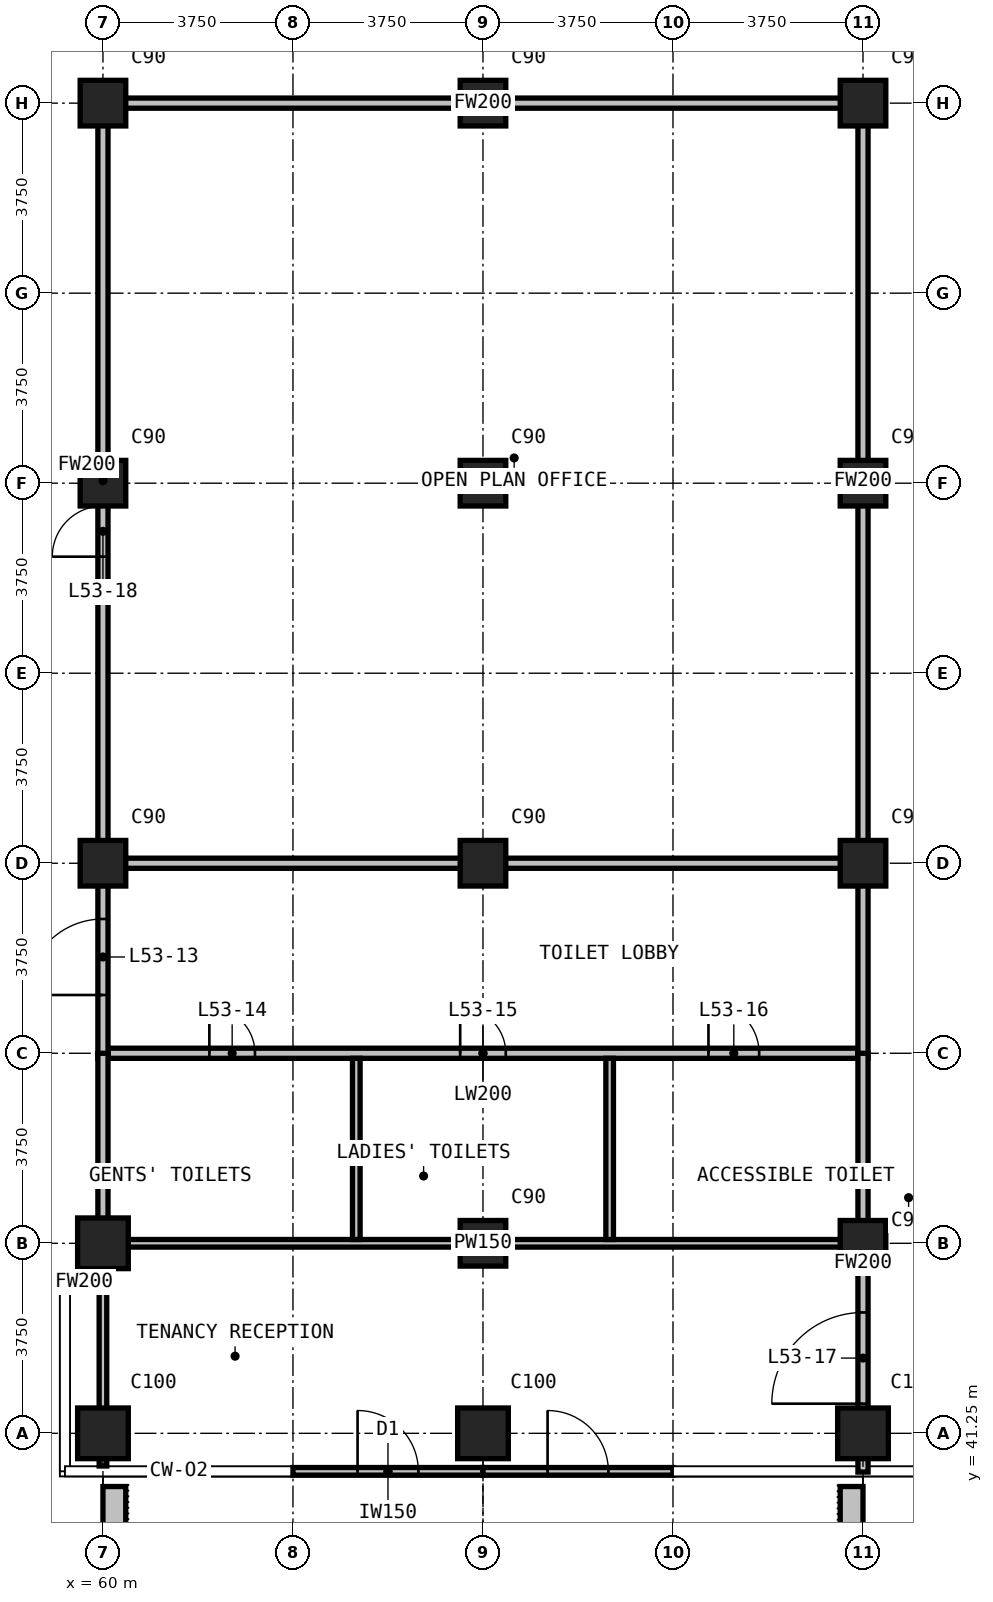
"""IFC4 building model, lengths in metres.
Left out: names, types, materials, properties, quantities, classifications, styles, units other than length and angle.
Written with IfcOpenShell. Run it as: python <this file> out.ifc"""

import sys

from ifc_helpers import new_model, si_unit, direction, frame, frame_2d, origin, origin_2d, place, context, subcontext, project, spatial, rectangle, extrude, element, fill, save


model = new_model("IFC4")
c1 = context("Model", 3, precision=1e-05, world=origin(), true_north=direction((0.0, 1.0)))
c2 = subcontext(c1, "Body", "Model", "MODEL_VIEW")
j1 = project(units=[si_unit("LENGTHUNIT", "METRE"), si_unit("PLANEANGLEUNIT", "RADIAN")], contexts=[c1])
p1 = place(None, origin())
s1 = spatial("IfcSite", under=j1, at=p1, CompositionType="ELEMENT")
p2 = place(p1, origin())
s2 = spatial("IfcBuilding", under=s1, at=p2, CompositionType="ELEMENT")
p3 = place(p2, frame((0.0, 0.0, 206.7)))
s3 = spatial("IfcBuildingStorey", under=s2, at=p3, CompositionType="ELEMENT", Elevation=206.7)
for number, where, z_axis, x_axis in (
    (1, (60.0, 41.25, 0.0), (0.0, 0.0, 1.0), (1.0, 0.0, 0.0)),
    (2, (60.0, 45.0, 0.0), (0.0, 0.0, 1.0), (1.0, 0.0, 0.0)),
):
    element("IfcColumn", number, at=place(p3, frame(where, z_axis=z_axis, x_axis=x_axis)), inside=s3, PredefinedType="COLUMN", context=c2, shape_type="SweptSolid", body=[
        extrude(rectangle(XDim=1.0, YDim=1.0, at=origin_2d()), origin(), (0.0, 0.0, 1.0), 3.6),
    ])
for number, where, z_axis, x_axis in (
    (3, (60.0, 52.5, 0.0), (0.0, 0.0, 1.0), (1.0, 0.0, 0.0)),
    (4, (60.0, 60.0, 0.0), (0.0, 0.0, 1.0), (1.0, 0.0, 0.0)),
    (5, (60.0, 67.5, 0.0), (0.0, 0.0, 1.0), (1.0, 0.0, 0.0)),
):
    element("IfcColumn", number, at=place(p3, frame(where, z_axis=z_axis, x_axis=x_axis)), inside=s3, PredefinedType="COLUMN", context=c2, shape_type="SweptSolid", body=[
        extrude(rectangle(XDim=0.9, YDim=0.9, at=origin_2d()), origin(), (0.0, 0.0, 1.0), 3.6),
    ])
p4 = place(p3, frame((67.5, 41.25, 0.0), z_axis=(0.0, 0.0, 1.0), x_axis=(1.0, 0.0, 0.0)))
e6 = element("IfcColumn", 6, at=p4, inside=s3, PredefinedType="COLUMN", context=c2, shape_type="SweptSolid", body=[
    extrude(rectangle(XDim=1.0, YDim=1.0, at=origin_2d()), origin(), (0.0, 0.0, 1.0), 3.6),
])
for number, where, z_axis, x_axis in (
    (7, (67.5, 45.0, 0.0), (0.0, 0.0, 1.0), (1.0, 0.0, 0.0)),
    (8, (67.5, 52.5, 0.0), (0.0, 0.0, 1.0), (1.0, 0.0, 0.0)),
    (9, (67.5, 60.0, 0.0), (0.0, 0.0, 1.0), (1.0, 0.0, 0.0)),
    (10, (67.5, 67.5, 0.0), (0.0, 0.0, 1.0), (1.0, 0.0, 0.0)),
):
    element("IfcColumn", number, at=place(p3, frame(where, z_axis=z_axis, x_axis=x_axis)), inside=s3, PredefinedType="COLUMN", context=c2, shape_type="SweptSolid", body=[
        extrude(rectangle(XDim=0.9, YDim=0.9, at=origin_2d()), origin(), (0.0, 0.0, 1.0), 3.6),
    ])
p5 = place(p3, frame((75.0, 41.25, 0.0), z_axis=(0.0, 0.0, 1.0), x_axis=(1.0, 0.0, 0.0)))
e11 = element("IfcColumn", 11, at=p5, inside=s3, PredefinedType="COLUMN", context=c2, shape_type="SweptSolid", body=[
    extrude(rectangle(XDim=1.0, YDim=1.0, at=origin_2d()), origin(), (0.0, 0.0, 1.0), 3.6),
])
for number, where, z_axis, x_axis in (
    (12, (75.0, 45.0, 0.0), (0.0, 0.0, 1.0), (1.0, 0.0, 0.0)),
    (13, (75.0, 52.5, 0.0), (0.0, 0.0, 1.0), (1.0, 0.0, 0.0)),
    (14, (75.0, 60.0, 0.0), (0.0, 0.0, 1.0), (1.0, 0.0, 0.0)),
    (15, (75.0, 67.5, 0.0), (0.0, 0.0, 1.0), (1.0, 0.0, 0.0)),
):
    element("IfcColumn", number, at=place(p3, frame(where, z_axis=z_axis, x_axis=x_axis)), inside=s3, PredefinedType="COLUMN", context=c2, shape_type="SweptSolid", body=[
        extrude(rectangle(XDim=0.9, YDim=0.9, at=origin_2d()), origin(), (0.0, 0.0, 1.0), 3.6),
    ])
p6 = place(p3, frame((63.75, 40.5, 0.0), z_axis=(0.0, 0.0, 1.0), x_axis=(1.0, 0.0, 0.0)))
e16 = element("IfcWall", 16, at=p6, inside=s3, PredefinedType="SOLIDWALL", context=c2, shape_type="SweptSolid", body=[
    extrude(rectangle(XDim=3.75, YDim=0.15, at=frame_2d((1.875, 0.0))), origin(), (0.0, 0.0, 1.0), 3.3),
])
p7 = place(p6, frame((1.275, 0.0, 0.0)))
e17 = element("IfcOpeningElement", 17, at=p7, cuts=e16, PredefinedType="OPENING", context=c2, shape_type="SweptSolid", body=[
    extrude(rectangle(XDim=1.2, YDim=2.4, at=frame_2d((0.6, 1.2))), frame((0.0, 0.085, 0.0), z_axis=(0.0, -1.0, 0.0), x_axis=(1.0, 0.0, 0.0)), (0.0, 0.0, 1.0), 0.17),
])
p8 = place(p3, frame((67.5, 40.5, 0.0), z_axis=(0.0, 0.0, 1.0), x_axis=(1.0, 0.0, 0.0)))
e18 = element("IfcWall", 18, at=p8, inside=s3, PredefinedType="SOLIDWALL", context=c2, shape_type="SweptSolid", body=[
    extrude(rectangle(XDim=3.75, YDim=0.15, at=frame_2d((1.875, 0.0))), origin(), (0.0, 0.0, 1.0), 3.3),
])
p9 = place(p8, frame((1.275, 0.0, 0.0)))
e19 = element("IfcOpeningElement", 19, at=p9, cuts=e18, PredefinedType="OPENING", context=c2, shape_type="SweptSolid", body=[
    extrude(rectangle(XDim=1.2, YDim=2.4, at=frame_2d((0.6, 1.2))), frame((0.0, 0.085, 0.0), z_axis=(0.0, -1.0, 0.0), x_axis=(1.0, 0.0, 0.0)), (0.0, 0.0, 1.0), 0.17),
])
for number, where, z_axis, x_axis in (
    (20, (60.225, 40.2, 0.0), (0.0, 0.0, 1.0), (0.0, -1.0, 0.0)),
    (21, (74.775, 40.2, 0.0), (0.0, 0.0, 1.0), (0.0, -1.0, 0.0)),
):
    element("IfcWall", number, at=place(p3, frame(where, z_axis=z_axis, x_axis=x_axis)), inside=s3, PredefinedType="USERDEFINED", context=c2, shape_type="SweptSolid", body=[
        extrude(rectangle(XDim=2.35, YDim=0.45, at=frame_2d((1.175, 0.0))), origin(), (0.0, 0.0, 1.0), 1.1),
    ])
p10 = place(p3, frame((60.1, 48.75, 0.0), z_axis=(0.0, 0.0, 1.0), x_axis=(1.0, 0.0, 0.0)))
e22 = element("IfcWall", 22, at=p10, inside=s3, PredefinedType="PARTITIONING", context=c2, shape_type="SweptSolid", body=[
    extrude(rectangle(XDim=14.8, YDim=0.2, at=frame_2d((7.4, 0.0))), origin(), (0.0, 0.0, 1.0), 3.3),
])
p11 = place(p10, frame((2.0, 0.0, 0.0)))
e23 = element("IfcOpeningElement", 23, at=p11, cuts=e22, PredefinedType="OPENING", context=c2, shape_type="SweptSolid", body=[
    extrude(rectangle(XDim=0.9, YDim=2.2, at=frame_2d((0.45, 1.1))), frame((0.0, 0.11, 0.0), z_axis=(0.0, -1.0, 0.0), x_axis=(1.0, 0.0, 0.0)), (0.0, 0.0, 1.0), 0.22),
])
p12 = place(p10, frame((6.95, 0.0, 0.0)))
e24 = element("IfcOpeningElement", 24, at=p12, cuts=e22, PredefinedType="OPENING", context=c2, shape_type="SweptSolid", body=[
    extrude(rectangle(XDim=0.9, YDim=2.2, at=frame_2d((0.45, 1.1))), frame((0.0, 0.11, 0.0), z_axis=(0.0, -1.0, 0.0), x_axis=(1.0, 0.0, 0.0)), (0.0, 0.0, 1.0), 0.22),
])
p13 = place(p10, frame((11.85, 0.0, 0.0)))
e25 = element("IfcOpeningElement", 25, at=p13, cuts=e22, PredefinedType="OPENING", context=c2, shape_type="SweptSolid", body=[
    extrude(rectangle(XDim=1.0, YDim=2.2, at=frame_2d((0.5, 1.1))), frame((0.0, 0.11, 0.0), z_axis=(0.0, -1.0, 0.0), x_axis=(1.0, 0.0, 0.0)), (0.0, 0.0, 1.0), 0.22),
])
p14 = place(p3, frame((60.1, 52.5, 0.0), z_axis=(0.0, 0.0, 1.0), x_axis=(1.0, 0.0, 0.0)))
e26 = element("IfcWall", 26, at=p14, inside=s3, PredefinedType="PARTITIONING", context=c2, shape_type="SweptSolid", body=[
    extrude(rectangle(XDim=14.8, YDim=0.2, at=frame_2d((7.4, 0.0))), origin(), (0.0, 0.0, 1.0), 3.3),
])
p15 = place(p3, frame((60.0, 48.65, 0.0), z_axis=(0.0, 0.0, 1.0), x_axis=(0.0, 1.0, 0.0)))
e27 = element("IfcWall", 27, at=p15, inside=s3, PredefinedType="PARTITIONING", context=c2, shape_type="SweptSolid", body=[
    extrude(rectangle(XDim=3.95, YDim=0.2, at=frame_2d((1.975, 0.0))), origin(), (0.0, 0.0, 1.0), 3.3),
])
p16 = place(p15, frame((1.25, 0.0, 0.0)))
e28 = element("IfcOpeningElement", 28, at=p16, cuts=e27, PredefinedType="OPENING", context=c2, shape_type="SweptSolid", body=[
    extrude(rectangle(XDim=1.5, YDim=2.2, at=frame_2d((0.75, 1.1))), frame((0.0, 0.11, 0.0), z_axis=(0.0, -1.0, 0.0), x_axis=(1.0, 0.0, 0.0)), (0.0, 0.0, 1.0), 0.22),
])
p17 = place(p3, frame((75.0, 48.65, 0.0), z_axis=(0.0, 0.0, 1.0), x_axis=(0.0, 1.0, 0.0)))
e29 = element("IfcWall", 29, at=p17, inside=s3, PredefinedType="PARTITIONING", context=c2, shape_type="SweptSolid", body=[
    extrude(rectangle(XDim=3.95, YDim=0.2, at=frame_2d((1.975, 0.0))), origin(), (0.0, 0.0, 1.0), 3.3),
])
p18 = place(p3, frame((59.355, 44.235, 0.0), z_axis=(0.0, 0.0, 1.0), x_axis=(1.0, 0.0, 0.0)))
e30 = element("IfcWall", 30, at=p18, inside=s3, PredefinedType="PARTITIONING", context=c2, shape_type="SweptSolid", body=[
    extrude(rectangle(XDim=0.545, YDim=0.2, at=frame_2d((0.272, 0.0))), origin(), (0.0, 0.0, 1.0), 3.3),
])
p19 = place(p3, frame((60.1, 67.5, 0.0), z_axis=(0.0, 0.0, 1.0), x_axis=(1.0, 0.0, 0.0)))
e31 = element("IfcWall", 31, at=p19, inside=s3, PredefinedType="PARTITIONING", context=c2, shape_type="SweptSolid", body=[
    extrude(rectangle(XDim=14.8, YDim=0.2, at=frame_2d((7.4, 0.0))), origin(), (0.0, 0.0, 1.0), 3.3),
])
p20 = place(p3, frame((60.0, 44.135, 0.0), z_axis=(0.0, 0.0, 1.0), x_axis=(0.0, 1.0, 0.0)))
e32 = element("IfcWall", 32, at=p20, inside=s3, PredefinedType="PARTITIONING", context=c2, shape_type="SweptSolid", body=[
    extrude(rectangle(XDim=4.615, YDim=0.2, at=frame_2d((2.308, 0.0))), origin(), (0.0, 0.0, 1.0), 3.3),
])
p21 = place(p3, frame((60.0, 52.5, 0.0), z_axis=(0.0, 0.0, 1.0), x_axis=(0.0, 1.0, 0.0)))
e33 = element("IfcWall", 33, at=p21, inside=s3, PredefinedType="PARTITIONING", context=c2, shape_type="SweptSolid", body=[
    extrude(rectangle(XDim=15.1, YDim=0.2, at=frame_2d((7.55, 0.0))), origin(), (0.0, 0.0, 1.0), 3.3),
])
p22 = place(p21, frame((6.05, 0.0, 0.0)))
e34 = element("IfcOpeningElement", 34, at=p22, cuts=e33, PredefinedType="OPENING", context=c2, shape_type="SweptSolid", body=[
    extrude(rectangle(XDim=1.0, YDim=2.2, at=frame_2d((0.5, 1.1))), frame((0.0, 0.11, 0.0), z_axis=(0.0, -1.0, 0.0), x_axis=(1.0, 0.0, 0.0)), (0.0, 0.0, 1.0), 0.22),
])
p23 = place(p3, frame((75.0, 40.485, 0.0), z_axis=(0.0, 0.0, 1.0), x_axis=(0.0, 1.0, 0.0)))
e35 = element("IfcWall", 35, at=p23, inside=s3, PredefinedType="PARTITIONING", context=c2, shape_type="SweptSolid", body=[
    extrude(rectangle(XDim=8.265, YDim=0.2, at=frame_2d((4.132, 0.0))), origin(), (0.0, 0.0, 1.0), 3.3),
])
p24 = place(p23, frame((1.35, 0.0, 0.0)))
e36 = element("IfcOpeningElement", 36, at=p24, cuts=e35, PredefinedType="OPENING", context=c2, shape_type="SweptSolid", body=[
    extrude(rectangle(XDim=1.8, YDim=2.2, at=frame_2d((0.9, 1.1))), frame((0.0, 0.11, 0.0), z_axis=(0.0, -1.0, 0.0), x_axis=(1.0, 0.0, 0.0)), (0.0, 0.0, 1.0), 0.22),
])
p25 = place(p3, frame((75.0, 52.5, 0.0), z_axis=(0.0, 0.0, 1.0), x_axis=(0.0, 1.0, 0.0)))
e37 = element("IfcWall", 37, at=p25, inside=s3, PredefinedType="PARTITIONING", context=c2, shape_type="SweptSolid", body=[
    extrude(rectangle(XDim=15.1, YDim=0.2, at=frame_2d((7.55, 0.0))), origin(), (0.0, 0.0, 1.0), 3.3),
])
p26 = place(p3, frame((60.1, 45.0, 0.0), z_axis=(0.0, 0.0, 1.0), x_axis=(1.0, 0.0, 0.0)))
e38 = element("IfcWall", 38, at=p26, inside=s3, PredefinedType="PARTITIONING", context=c2, shape_type="SweptSolid", body=[
    extrude(rectangle(XDim=14.8, YDim=0.15, at=frame_2d((7.4, 0.0))), origin(), (0.0, 0.0, 1.0), 3.3),
])
p27 = place(p3, frame((60.0, 40.605, 0.0), z_axis=(0.0, 0.0, 1.0), x_axis=(0.0, 1.0, 0.0)))
e39 = element("IfcWall", 39, at=p27, inside=s3, PredefinedType="PARTITIONING", context=c2, shape_type="SweptSolid", body=[
    extrude(rectangle(XDim=3.6, YDim=0.15, at=frame_2d((1.8, 0.0))), origin(), (0.0, 0.0, 1.0), 3.3),
])
for number, where, z_axis, x_axis in (
    (40, (65.0, 45.075, 0.0), (0.0, 0.0, 1.0), (0.0, 1.0, 0.0)),
    (41, (70.0, 45.075, 0.0), (0.0, 0.0, 1.0), (0.0, 1.0, 0.0)),
):
    element("IfcWall", number, at=place(p3, frame(where, z_axis=z_axis, x_axis=x_axis)), inside=s3, PredefinedType="PARTITIONING", context=c2, shape_type="SweptSolid", body=[
        extrude(rectangle(XDim=3.575, YDim=0.15, at=frame_2d((1.788, 0.0))), origin(), (0.0, 0.0, 1.0), 3.3),
    ])
p28 = place(p7, origin())
e42 = element("IfcDoor", 42, at=p28, inside=s3, OperationType="SINGLE_SWING_LEFT", PredefinedType="DOOR", context=c2, shape_type="SweptSolid", body=[
    extrude(rectangle(XDim=1.2, YDim=2.4, at=frame_2d((0.6, 1.2))), frame((0.0, 0.025, 0.0), z_axis=(0.0, -1.0, 0.0), x_axis=(1.0, 0.0, 0.0)), (0.0, 0.0, 1.0), 0.05),
])
fill(e17, e42)
p29 = place(p9, origin())
e43 = element("IfcDoor", 43, at=p29, inside=s3, OperationType="SINGLE_SWING_LEFT", PredefinedType="DOOR", context=c2, shape_type="SweptSolid", body=[
    extrude(rectangle(XDim=1.2, YDim=2.4, at=frame_2d((0.6, 1.2))), frame((0.0, 0.025, 0.0), z_axis=(0.0, -1.0, 0.0), x_axis=(1.0, 0.0, 0.0)), (0.0, 0.0, 1.0), 0.05),
])
fill(e19, e43)
p30 = place(p16, origin())
e44 = element("IfcDoor", 44, at=p30, inside=s3, OperationType="DOUBLE_DOOR_SINGLE_SWING", PredefinedType="DOOR", context=c2, shape_type="SweptSolid", body=[
    extrude(rectangle(XDim=1.5, YDim=2.2, at=frame_2d((0.75, 1.1))), frame((0.0, 0.025, 0.0), z_axis=(0.0, -1.0, 0.0), x_axis=(1.0, 0.0, 0.0)), (0.0, 0.0, 1.0), 0.05),
])
fill(e28, e44)
p31 = place(p11, origin())
e45 = element("IfcDoor", 45, at=p31, inside=s3, OperationType="SINGLE_SWING_RIGHT", PredefinedType="DOOR", context=c2, shape_type="SweptSolid", body=[
    extrude(rectangle(XDim=0.9, YDim=2.2, at=frame_2d((0.45, 1.1))), frame((0.0, 0.025, 0.0), z_axis=(0.0, -1.0, 0.0), x_axis=(1.0, 0.0, 0.0)), (0.0, 0.0, 1.0), 0.05),
])
fill(e23, e45)
p32 = place(p12, origin())
e46 = element("IfcDoor", 46, at=p32, inside=s3, OperationType="SINGLE_SWING_RIGHT", PredefinedType="DOOR", context=c2, shape_type="SweptSolid", body=[
    extrude(rectangle(XDim=0.9, YDim=2.2, at=frame_2d((0.45, 1.1))), frame((0.0, 0.025, 0.0), z_axis=(0.0, -1.0, 0.0), x_axis=(1.0, 0.0, 0.0)), (0.0, 0.0, 1.0), 0.05),
])
fill(e24, e46)
p33 = place(p13, origin())
e47 = element("IfcDoor", 47, at=p33, inside=s3, OperationType="SINGLE_SWING_RIGHT", PredefinedType="DOOR", context=c2, shape_type="SweptSolid", body=[
    extrude(rectangle(XDim=1.0, YDim=2.2, at=frame_2d((0.5, 1.1))), frame((0.0, 0.025, 0.0), z_axis=(0.0, -1.0, 0.0), x_axis=(1.0, 0.0, 0.0)), (0.0, 0.0, 1.0), 0.05),
])
fill(e25, e47)
p34 = place(p24, origin())
e48 = element("IfcDoor", 48, at=p34, inside=s3, OperationType="DOUBLE_DOOR_SINGLE_SWING", PredefinedType="DOOR", context=c2, shape_type="SweptSolid", body=[
    extrude(rectangle(XDim=1.8, YDim=2.2, at=frame_2d((0.9, 1.1))), frame((0.0, 0.025, 0.0), z_axis=(0.0, -1.0, 0.0), x_axis=(1.0, 0.0, 0.0)), (0.0, 0.0, 1.0), 0.05),
])
fill(e36, e48)
p35 = place(p22, origin())
e49 = element("IfcDoor", 49, at=p35, inside=s3, OperationType="SINGLE_SWING_RIGHT", PredefinedType="DOOR", context=c2, shape_type="SweptSolid", body=[
    extrude(rectangle(XDim=1.0, YDim=2.2, at=frame_2d((0.5, 1.1))), frame((0.0, 0.025, 0.0), z_axis=(0.0, -1.0, 0.0), x_axis=(1.0, 0.0, 0.0)), (0.0, 0.0, 1.0), 0.05),
])
fill(e34, e49)
save(model, sys.argv[1])
